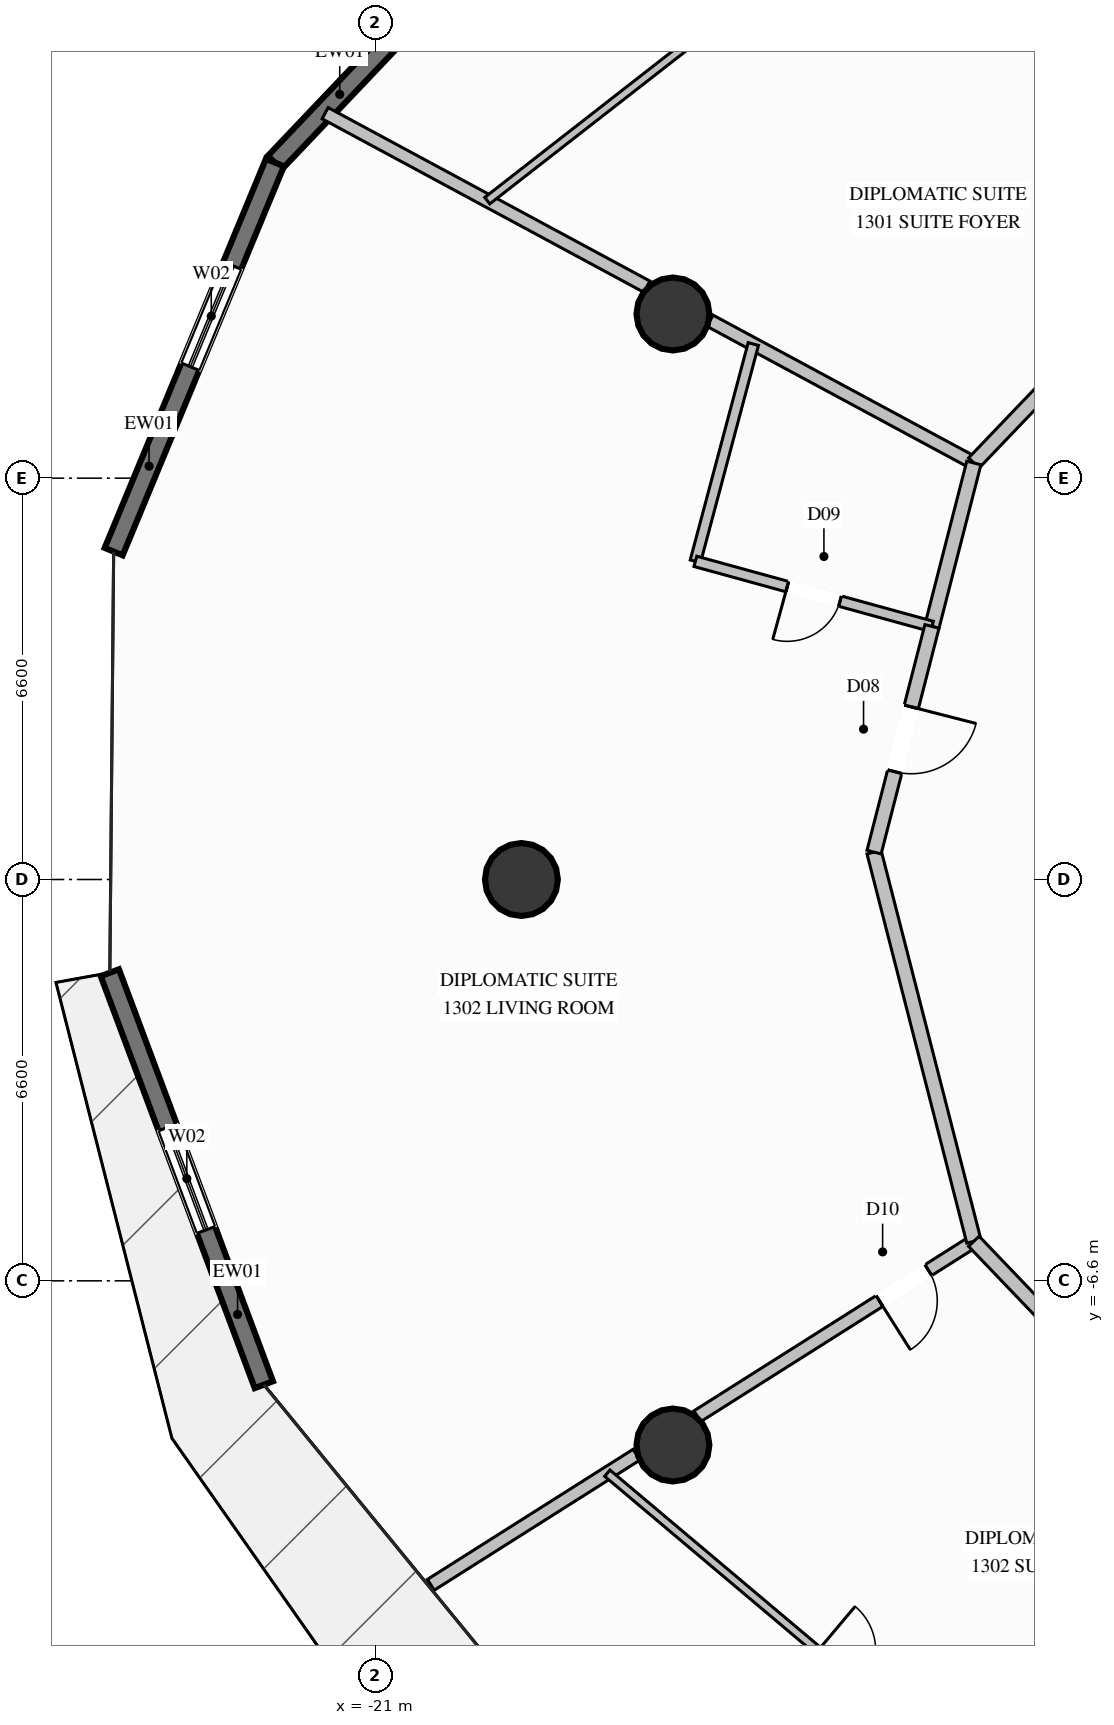
"""IFC4 building model, lengths in metres.
Left out: names, types, materials, properties, quantities, classifications, styles, units other than length and angle.
Written with IfcOpenShell. Run it as: python <this file> out.ifc"""

import sys

from ifc_helpers import new_model, si_unit, direction, frame, frame_2d, origin, origin_2d, place, context, subcontext, project, spatial, rectangle, circle, extrude, element, fill, save


model = new_model("IFC4")
c1 = context("Model", 3, precision=1e-05, world=origin(), true_north=direction((0.0, 1.0)))
c2 = subcontext(c1, "Body", "Model", "MODEL_VIEW")
j1 = project(units=[si_unit("LENGTHUNIT", "METRE"), si_unit("PLANEANGLEUNIT", "RADIAN")], contexts=[c1])
p1 = place(None, origin())
s1 = spatial("IfcSite", under=j1, at=p1, CompositionType="ELEMENT")
p2 = place(p1, origin())
s2 = spatial("IfcBuilding", under=s1, at=p2, CompositionType="ELEMENT")
p3 = place(p2, frame((0.0, 0.0, 50.0)))
s3 = spatial("IfcBuildingStorey", under=s2, at=p3, CompositionType="ELEMENT", Elevation=50.0)
for number, where, z_axis, x_axis in (
    (1, (-16.108, 9.3, 0.0), (0.0, 0.0, 1.0), (1.0, 0.0, 0.0)),
    (2, (-18.6, 0.0, 0.0), (0.0, 0.0, 1.0), (1.0, 0.0, 0.0)),
    (3, (-16.108, -9.3, 0.0), (0.0, 0.0, 1.0), (1.0, 0.0, 0.0)),
):
    element("IfcColumn", number, at=place(p3, frame(where, z_axis=z_axis, x_axis=x_axis)), inside=s3, PredefinedType="COLUMN", context=c2, shape_type="SweptSolid", body=[
        extrude(circle(Radius=0.6, at=origin_2d()), origin(), (0.0, 0.0, 1.0), 3.6),
    ])
p4 = place(p3, frame((-22.654, 11.79, 0.0), z_axis=(0.0, 0.0, 1.0), x_axis=(0.688922418365, 0.724835085708, 0.0)))
e4 = element("IfcWall", 4, at=p4, inside=s3, PredefinedType="SOLIDWALL", context=c2, shape_type="SweptSolid", body=[
    extrude(rectangle(XDim=7.233, YDim=0.32, at=frame_2d((3.617, 0.0))), origin(), (0.0, 0.0, 1.0), 3.34),
])
p5 = place(p4, frame((3.345, 0.0, 0.35)))
e5 = element("IfcOpeningElement", 5, at=p5, cuts=e4, PredefinedType="OPENING", context=c2, shape_type="SweptSolid", body=[
    extrude(rectangle(XDim=1.8, YDim=2.6, at=frame_2d((0.9, 1.3))), frame((0.0, 0.17, 0.0), z_axis=(0.0, -1.0, 0.0), x_axis=(1.0, 0.0, 0.0)), (0.0, 0.0, 1.0), 0.34),
])
p6 = place(p3, frame((-25.306, 5.392, 0.0), z_axis=(0.0, 0.0, 1.0), x_axis=(0.382897635177, 0.923790777707, 0.0)))
e6 = element("IfcWall", 6, at=p6, inside=s3, PredefinedType="SOLIDWALL", context=c2, shape_type="SweptSolid", body=[
    extrude(rectangle(XDim=6.926, YDim=0.32, at=frame_2d((3.463, 0.0))), origin(), (0.0, 0.0, 1.0), 3.34),
])
p7 = place(p6, frame((3.292, 0.0, 0.35)))
e7 = element("IfcOpeningElement", 7, at=p7, cuts=e6, PredefinedType="OPENING", context=c2, shape_type="SweptSolid", body=[
    extrude(rectangle(XDim=1.8, YDim=2.6, at=frame_2d((0.9, 1.3))), frame((0.0, 0.17, 0.0), z_axis=(0.0, -1.0, 0.0), x_axis=(1.0, 0.0, 0.0)), (0.0, 0.0, 1.0), 0.34),
])
p8 = place(p3, frame((-22.836, -8.308, 0.0), z_axis=(0.0, 0.0, 1.0), x_axis=(-0.350187429463, 0.936679648677, 0.0)))
e8 = element("IfcWall", 8, at=p8, inside=s3, PredefinedType="SOLIDWALL", context=c2, shape_type="SweptSolid", body=[
    extrude(rectangle(XDim=7.233, YDim=0.32, at=frame_2d((3.617, 0.0))), origin(), (0.0, 0.0, 1.0), 3.34),
])
p9 = place(p8, frame((2.717, 0.0, 0.35)))
e9 = element("IfcOpeningElement", 9, at=p9, cuts=e8, PredefinedType="OPENING", context=c2, shape_type="SweptSolid", body=[
    extrude(rectangle(XDim=1.8, YDim=2.6, at=frame_2d((0.9, 1.3))), frame((0.0, 0.17, 0.0), z_axis=(0.0, -1.0, 0.0), x_axis=(1.0, 0.0, 0.0)), (0.0, 0.0, 1.0), 0.34),
])
p10 = place(p3, frame((-11.159, 6.85, 0.0), z_axis=(0.0, 0.0, 1.0), x_axis=(-0.880265861415, 0.47448078278, 0.0)))
e10 = element("IfcWall", 10, at=p10, inside=s3, PredefinedType="PARTITIONING", context=c2, shape_type="SweptSolid", body=[
    extrude(rectangle(XDim=4.929, YDim=0.21, at=frame_2d((2.465, 0.0))), origin(), (0.0, 0.0, 1.0), 2.708),
])
p11 = place(p3, frame((-16.536, 9.749, 0.0), z_axis=(0.0, 0.0, 1.0), x_axis=(-0.880228451762, 0.474550179336, 0.0)))
e11 = element("IfcWall", 11, at=p11, inside=s3, PredefinedType="PARTITIONING", context=c2, shape_type="SweptSolid", body=[
    extrude(rectangle(XDim=6.012, YDim=0.21, at=frame_2d((3.006, 0.0))), origin(), (0.0, 0.0, 1.0), 3.34),
])
p12 = place(p3, frame((-11.159, -5.95, 0.0), z_axis=(0.0, 0.0, 1.0), x_axis=(-0.845113553302, -0.534586833008, 0.0)))
e12 = element("IfcWall", 12, at=p12, inside=s3, PredefinedType="PARTITIONING", context=c2, shape_type="SweptSolid", body=[
    extrude(rectangle(XDim=5.382, YDim=0.21, at=frame_2d((2.691, 0.0))), origin(), (0.0, 0.0, 1.0), 2.708),
])
p13 = place(p12, frame((0.886, 0.0, 0.0)))
e13 = element("IfcOpeningElement", 13, at=p13, cuts=e12, PredefinedType="OPENING", context=c2, shape_type="SweptSolid", body=[
    extrude(rectangle(XDim=0.95, YDim=2.1, at=frame_2d((0.475, 1.05))), frame((0.0, 0.115, 0.0), z_axis=(0.0, -1.0, 0.0), x_axis=(1.0, 0.0, 0.0)), (0.0, 0.0, 1.0), 0.23),
])
p14 = place(p3, frame((-16.707, -9.459, 0.0), z_axis=(0.0, 0.0, 1.0), x_axis=(-0.845097392872, -0.53461237973, 0.0)))
e14 = element("IfcWall", 14, at=p14, inside=s3, PredefinedType="PARTITIONING", context=c2, shape_type="SweptSolid", body=[
    extrude(rectangle(XDim=4.003, YDim=0.21, at=frame_2d((2.001, 0.0))), origin(), (0.0, 0.0, 1.0), 3.34),
])
p15 = place(p3, frame((-6.675, 11.535, 0.0), z_axis=(0.0, 0.0, 1.0), x_axis=(-0.691444859665, -0.722429239471, 0.0)))
e15 = element("IfcWall", 15, at=p15, inside=s3, PredefinedType="PARTITIONING", context=c2, shape_type="SweptSolid", body=[
    extrude(rectangle(XDim=6.485, YDim=0.24, at=frame_2d((3.242, 0.0))), origin(), (0.0, 0.0, 1.0), 3.34),
])
p16 = place(p3, frame((-10.394, 17.997, 0.0), z_axis=(0.0, 0.0, 1.0), x_axis=(-0.788726154844, -0.614744705276, 0.0)))
e16 = element("IfcWall", 16, at=p16, inside=s3, PredefinedType="PARTITIONING", context=c2, shape_type="SweptSolid", body=[
    extrude(rectangle(XDim=11.115, YDim=0.135, at=frame_2d((5.558, 0.0))), origin(), (0.0, 0.0, 1.0), 3.34),
])
p17 = place(p16, frame((5.083, 0.0, 0.0)))
e17 = element("IfcOpeningElement", 17, at=p17, cuts=e16, PredefinedType="OPENING", context=c2, shape_type="SweptSolid", body=[
    extrude(rectangle(XDim=0.95, YDim=2.1, at=frame_2d((0.475, 1.05))), frame((0.0, 0.078, 0.0), z_axis=(0.0, -1.0, 0.0), x_axis=(1.0, 0.0, 0.0)), (0.0, 0.0, 1.0), 0.155),
])
p18 = place(p3, frame((-11.159, 6.85, 0.0), z_axis=(0.0, 0.0, 1.0), x_axis=(-0.248286444079, -0.968686658154, 0.0)))
e18 = element("IfcWall", 18, at=p18, inside=s3, PredefinedType="PARTITIONING", context=c2, shape_type="SweptSolid", body=[
    extrude(rectangle(XDim=2.775, YDim=0.24, at=frame_2d((1.387, 0.0))), origin(), (0.0, 0.0, 1.0), 3.34),
])
p19 = place(p3, frame((-14.786, 8.806, 0.0), z_axis=(0.0, 0.0, 1.0), x_axis=(-0.25767908302, -0.966230557462, 0.0)))
e19 = element("IfcWall", 19, at=p19, inside=s3, PredefinedType="PLUMBINGWALL", context=c2, shape_type="SweptSolid", body=[
    extrude(rectangle(XDim=3.699, YDim=0.175, at=frame_2d((1.85, 0.0))), origin(), (0.0, 0.0, 1.0), 3.34),
])
p20 = place(p3, frame((-11.848, 4.162, 0.0), z_axis=(0.0, 0.0, 1.0), x_axis=(-0.964220085246, 0.265103050166, 0.0)))
e20 = element("IfcWall", 20, at=p20, inside=s3, PredefinedType="PLUMBINGWALL", context=c2, shape_type="SweptSolid", body=[
    extrude(rectangle(XDim=4.035, YDim=0.175, at=frame_2d((2.018, 0.0))), origin(), (0.0, 0.0, 1.0), 3.34),
])
p21 = place(p20, frame((1.568, 0.0, 0.0)))
e21 = element("IfcOpeningElement", 21, at=p21, cuts=e20, PredefinedType="OPENING", context=c2, shape_type="SweptSolid", body=[
    extrude(rectangle(XDim=0.9, YDim=2.1, at=frame_2d((0.45, 1.05))), frame((0.0, 0.098, 0.0), z_axis=(0.0, -1.0, 0.0), x_axis=(1.0, 0.0, 0.0)), (0.0, 0.0, 1.0), 0.195),
])
p22 = place(p3, frame((-12.8, 0.45, 0.0), z_axis=(0.0, 0.0, 1.0), x_axis=(0.24839135289, -0.968659762667, 0.0)))
e22 = element("IfcWall", 22, at=p22, inside=s3, PredefinedType="PARTITIONING", context=c2, shape_type="SweptSolid", body=[
    extrude(rectangle(XDim=6.607, YDim=0.24, at=frame_2d((3.303, 0.0))), origin(), (0.0, 0.0, 1.0), 2.919),
])
p23 = place(p3, frame((-11.848, 4.162, 0.0), z_axis=(0.0, 0.0, 1.0), x_axis=(-0.248451984896, -0.968644212909, 0.0)))
e23 = element("IfcWall", 23, at=p23, inside=s3, PredefinedType="PARTITIONING", context=c2, shape_type="SweptSolid", body=[
    extrude(rectangle(XDim=3.832, YDim=0.24, at=frame_2d((1.916, 0.0))), origin(), (0.0, 0.0, 1.0), 3.34),
])
p24 = place(p23, frame((1.366, 0.0, 0.0)))
e24 = element("IfcOpeningElement", 24, at=p24, cuts=e23, PredefinedType="OPENING", context=c2, shape_type="SweptSolid", body=[
    extrude(rectangle(XDim=1.1, YDim=2.3, at=frame_2d((0.55, 1.15))), frame((0.0, 0.13, 0.0), z_axis=(0.0, -1.0, 0.0), x_axis=(1.0, 0.0, 0.0)), (0.0, 0.0, 1.0), 0.26),
])
p25 = place(p3, frame((-11.159, -5.95, 0.0), z_axis=(0.0, 0.0, 1.0), x_axis=(0.691426053968, -0.722447238138, 0.0)))
e25 = element("IfcWall", 25, at=p25, inside=s3, PredefinedType="PARTITIONING", context=c2, shape_type="SweptSolid", body=[
    extrude(rectangle(XDim=6.485, YDim=0.24, at=frame_2d((3.242, 0.0))), origin(), (0.0, 0.0, 1.0), 3.34),
])
p26 = place(p3, frame((-17.187, -9.763, 0.0), z_axis=(0.0, 0.0, 1.0), x_axis=(0.764837174909, -0.644223638092, 0.0)))
e26 = element("IfcWall", 26, at=p26, inside=s3, PredefinedType="PARTITIONING", context=c2, shape_type="SweptSolid", body=[
    extrude(rectangle(XDim=10.007, YDim=0.135, at=frame_2d((5.004, 0.0))), origin(), (0.0, 0.0, 1.0), 2.792),
])
p27 = place(p26, frame((4.529, 0.0, 0.0)))
e27 = element("IfcOpeningElement", 27, at=p27, cuts=e26, PredefinedType="OPENING", context=c2, shape_type="SweptSolid", body=[
    extrude(rectangle(XDim=0.95, YDim=2.1, at=frame_2d((0.475, 1.05))), frame((0.0, 0.078, 0.0), z_axis=(0.0, -1.0, 0.0), x_axis=(1.0, 0.0, 0.0)), (0.0, 0.0, 1.0), 0.155),
])
p28 = place(p7, origin())
e28 = element("IfcWindow", 28, at=p28, inside=s3, PartitioningType="SINGLE_PANEL", PredefinedType="WINDOW", context=c2, shape_type="SweptSolid", body=[
    extrude(rectangle(XDim=1.8, YDim=2.6, at=frame_2d((0.9, 1.3))), frame((0.0, 0.03, 0.0), z_axis=(0.0, -1.0, 0.0), x_axis=(1.0, 0.0, 0.0)), (0.0, 0.0, 1.0), 0.06),
])
fill(e7, e28)
p29 = place(p9, origin())
e29 = element("IfcWindow", 29, at=p29, inside=s3, PartitioningType="SINGLE_PANEL", PredefinedType="WINDOW", context=c2, shape_type="SweptSolid", body=[
    extrude(rectangle(XDim=1.8, YDim=2.6, at=frame_2d((0.9, 1.3))), frame((0.0, 0.03, 0.0), z_axis=(0.0, -1.0, 0.0), x_axis=(1.0, 0.0, 0.0)), (0.0, 0.0, 1.0), 0.06),
])
fill(e9, e29)
p30 = place(p21, origin())
e30 = element("IfcDoor", 30, at=p30, inside=s3, OperationType="SINGLE_SWING_RIGHT", PredefinedType="DOOR", context=c2, shape_type="SweptSolid", body=[
    extrude(rectangle(XDim=0.9, YDim=2.1, at=frame_2d((0.45, 1.05))), frame((0.0, 0.025, 0.0), z_axis=(0.0, -1.0, 0.0), x_axis=(1.0, 0.0, 0.0)), (0.0, 0.0, 1.0), 0.05),
])
fill(e21, e30)
p31 = place(p24, origin())
e31 = element("IfcDoor", 31, at=p31, inside=s3, OperationType="SINGLE_SWING_LEFT", PredefinedType="DOOR", context=c2, shape_type="SweptSolid", body=[
    extrude(rectangle(XDim=1.1, YDim=2.3, at=frame_2d((0.55, 1.15))), frame((0.0, 0.025, 0.0), z_axis=(0.0, -1.0, 0.0), x_axis=(1.0, 0.0, 0.0)), (0.0, 0.0, 1.0), 0.05),
])
fill(e24, e31)
p32 = place(p13, origin())
e32 = element("IfcDoor", 32, at=p32, inside=s3, OperationType="SINGLE_SWING_RIGHT", PredefinedType="DOOR", context=c2, shape_type="SweptSolid", body=[
    extrude(rectangle(XDim=0.95, YDim=2.1, at=frame_2d((0.475, 1.05))), frame((0.0, 0.025, 0.0), z_axis=(0.0, -1.0, 0.0), x_axis=(1.0, 0.0, 0.0)), (0.0, 0.0, 1.0), 0.05),
])
fill(e13, e32)
save(model, sys.argv[1])
